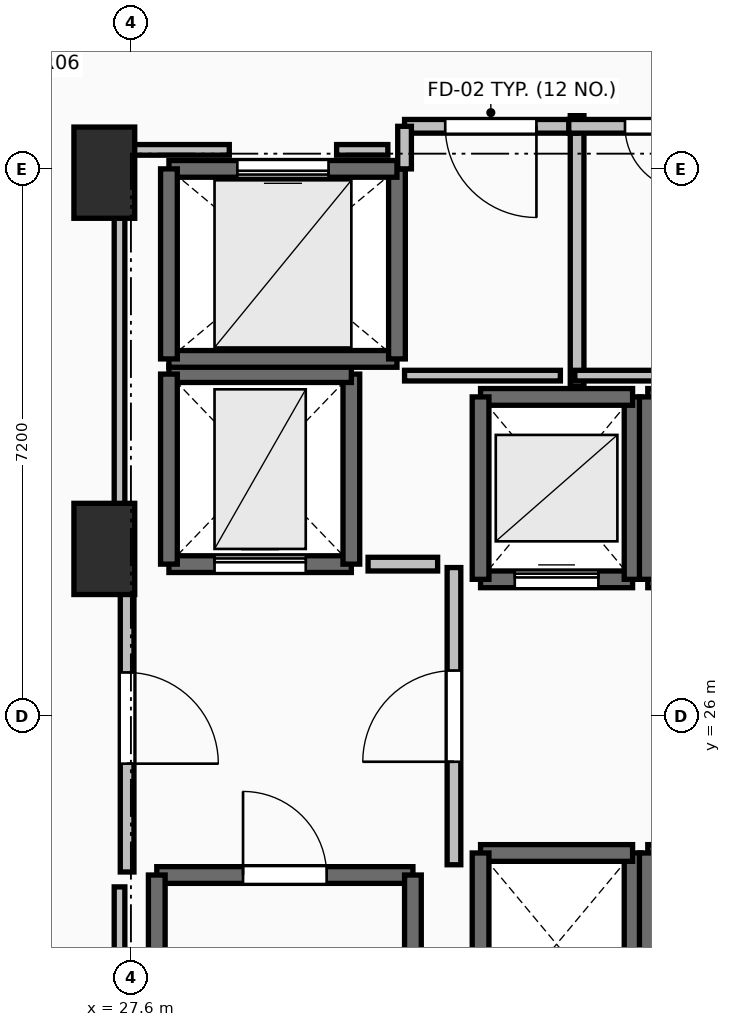
"""IFC4 building model, lengths in metres.
Left out: names, types, materials, properties, quantities, classifications, styles, units other than length and angle.
Written with IfcOpenShell. Run it as: python <this file> out.ifc"""

import sys

from ifc_helpers import new_model, si_unit, direction, frame, frame_2d, origin, origin_2d, place, context, subcontext, project, spatial, rectangle, extrude, element, fill, save


model = new_model("IFC4")
c1 = context("Model", 3, precision=1e-05, world=origin(), true_north=direction((0.0, 1.0)))
c2 = subcontext(c1, "Body", "Model", "MODEL_VIEW")
j1 = project(units=[si_unit("LENGTHUNIT", "METRE"), si_unit("PLANEANGLEUNIT", "RADIAN")], contexts=[c1])
p1 = place(None, origin())
s1 = spatial("IfcSite", under=j1, at=p1, CompositionType="ELEMENT")
p2 = place(p1, origin())
s2 = spatial("IfcBuilding", under=s1, at=p2, CompositionType="ELEMENT")
p3 = place(p2, frame((0.0, 0.0, 14.4)))
s3 = spatial("IfcBuildingStorey", under=s2, at=p3, CompositionType="ELEMENT", Elevation=14.4)
for number, where, z_axis, x_axis in (
    (1, (27.25, 28.2, 0.0), (0.0, 0.0, 1.0), (1.0, 0.0, 0.0)),
    (2, (27.25, 33.15, 0.0), (0.0, 0.0, 1.0), (1.0, 0.0, 0.0)),
):
    element("IfcColumn", number, at=place(p3, frame(where, z_axis=z_axis, x_axis=x_axis)), inside=s3, PredefinedType="PILASTER", context=c2, shape_type="SweptSolid", body=[
        extrude(rectangle(XDim=0.8, YDim=1.2, at=origin_2d()), origin(), (0.0, 0.0, 1.0), 4.8),
    ])
p4 = place(p3, frame((27.94, 23.91, 0.0), z_axis=(0.0, 0.0, 1.0), x_axis=(1.0, 0.0, 0.0)))
e3 = element("IfcWall", 3, at=p4, inside=s3, PredefinedType="SOLIDWALL", context=c2, shape_type="SweptSolid", body=[
    extrude(rectangle(XDim=3.37, YDim=0.22, at=frame_2d((1.685, 0.0))), origin(), (0.0, 0.0, 1.0), 4.48),
])
p5 = place(p4, frame((1.135, 0.0, 0.0)))
e4 = element("IfcOpeningElement", 4, at=p5, cuts=e3, PredefinedType="OPENING", context=c2, shape_type="SweptSolid", body=[
    extrude(rectangle(XDim=1.1, YDim=2.15, at=frame_2d((0.55, 1.075))), frame((0.0, 0.125, 0.0), z_axis=(0.0, -1.0, 0.0), x_axis=(1.0, 0.0, 0.0)), (0.0, 0.0, 1.0), 0.25),
])
for number, where, z_axis, x_axis in (
    (5, (31.31, 23.91, 0.0), (0.0, 0.0, 1.0), (0.0, -1.0, 0.0)),
    (6, (27.94, 16.49, 0.0), (0.0, 0.0, 1.0), (0.0, 1.0, 0.0)),
):
    element("IfcWall", number, at=place(p3, frame(where, z_axis=z_axis, x_axis=x_axis)), inside=s3, PredefinedType="SOLIDWALL", context=c2, shape_type="SweptSolid", body=[
        extrude(rectangle(XDim=7.42, YDim=0.22, at=frame_2d((3.71, 0.0))), origin(), (0.0, 0.0, 1.0), 4.48),
    ])
p6 = place(p3, frame((32.2, 27.8, 0.0), z_axis=(0.0, 0.0, 1.0), x_axis=(1.0, 0.0, 0.0)))
e7 = element("IfcWall", 7, at=p6, inside=s3, PredefinedType="SOLIDWALL", context=c2, shape_type="SweptSolid", body=[
    extrude(rectangle(XDim=2.0, YDim=0.22, at=frame_2d((1.0, 0.0))), origin(), (0.0, 0.0, 1.0), 4.48),
])
p7 = place(p6, frame((0.45, 0.0, 0.0)))
e8 = element("IfcOpeningElement", 8, at=p7, cuts=e7, PredefinedType="OPENING", context=c2, shape_type="SweptSolid", body=[
    extrude(rectangle(XDim=1.1, YDim=2.2, at=frame_2d((0.55, 1.1))), frame((0.0, 0.125, 0.0), z_axis=(0.0, -1.0, 0.0), x_axis=(1.0, 0.0, 0.0)), (0.0, 0.0, 1.0), 0.25),
])
p8 = place(p3, frame((34.2, 27.8, 0.0), z_axis=(0.0, 0.0, 1.0), x_axis=(0.0, 1.0, 0.0)))
e9 = element("IfcWall", 9, at=p8, inside=s3, PredefinedType="SOLIDWALL", context=c2, shape_type="SweptSolid", body=[
    extrude(rectangle(XDim=2.4, YDim=0.22, at=frame_2d((1.2, 0.0))), origin(), (0.0, 0.0, 1.0), 4.48),
])
p9 = place(p3, frame((34.2, 30.2, 0.0), z_axis=(0.0, 0.0, 1.0), x_axis=(-1.0, 0.0, 0.0)))
e10 = element("IfcWall", 10, at=p9, inside=s3, PredefinedType="SOLIDWALL", context=c2, shape_type="SweptSolid", body=[
    extrude(rectangle(XDim=2.0, YDim=0.22, at=frame_2d((1.0, 0.0))), origin(), (0.0, 0.0, 1.0), 4.48),
])
p10 = place(p3, frame((32.2, 30.2, 0.0), z_axis=(0.0, 0.0, 1.0), x_axis=(0.0, -1.0, 0.0)))
e11 = element("IfcWall", 11, at=p10, inside=s3, PredefinedType="SOLIDWALL", context=c2, shape_type="SweptSolid", body=[
    extrude(rectangle(XDim=2.4, YDim=0.22, at=frame_2d((1.2, 0.0))), origin(), (0.0, 0.0, 1.0), 4.48),
])
p11 = place(p3, frame((34.4, 27.8, 0.0), z_axis=(0.0, 0.0, 1.0), x_axis=(1.0, 0.0, 0.0)))
e12 = element("IfcWall", 12, at=p11, inside=s3, PredefinedType="SOLIDWALL", context=c2, shape_type="SweptSolid", body=[
    extrude(rectangle(XDim=2.0, YDim=0.22, at=frame_2d((1.0, 0.0))), origin(), (0.0, 0.0, 1.0), 4.48),
])
p12 = place(p11, frame((0.45, 0.0, 0.0)))
e13 = element("IfcOpeningElement", 13, at=p12, cuts=e12, PredefinedType="OPENING", context=c2, shape_type="SweptSolid", body=[
    extrude(rectangle(XDim=1.1, YDim=2.2, at=frame_2d((0.55, 1.1))), frame((0.0, 0.125, 0.0), z_axis=(0.0, -1.0, 0.0), x_axis=(1.0, 0.0, 0.0)), (0.0, 0.0, 1.0), 0.25),
])
p13 = place(p3, frame((36.4, 30.2, 0.0), z_axis=(0.0, 0.0, 1.0), x_axis=(-1.0, 0.0, 0.0)))
e14 = element("IfcWall", 14, at=p13, inside=s3, PredefinedType="SOLIDWALL", context=c2, shape_type="SweptSolid", body=[
    extrude(rectangle(XDim=2.0, YDim=0.22, at=frame_2d((1.0, 0.0))), origin(), (0.0, 0.0, 1.0), 4.48),
])
for number, where, z_axis, x_axis in (
    (15, (34.4, 30.2, 0.0), (0.0, 0.0, 1.0), (0.0, -1.0, 0.0)),
    (16, (34.2, 21.8, 0.0), (0.0, 0.0, 1.0), (0.0, 1.0, 0.0)),
):
    element("IfcWall", number, at=place(p3, frame(where, z_axis=z_axis, x_axis=x_axis)), inside=s3, PredefinedType="SOLIDWALL", context=c2, shape_type="SweptSolid", body=[
        extrude(rectangle(XDim=2.4, YDim=0.22, at=frame_2d((1.2, 0.0))), origin(), (0.0, 0.0, 1.0), 4.48),
    ])
p14 = place(p3, frame((34.2, 24.2, 0.0), z_axis=(0.0, 0.0, 1.0), x_axis=(-1.0, 0.0, 0.0)))
e17 = element("IfcWall", 17, at=p14, inside=s3, PredefinedType="SOLIDWALL", context=c2, shape_type="SweptSolid", body=[
    extrude(rectangle(XDim=2.0, YDim=0.22, at=frame_2d((1.0, 0.0))), origin(), (0.0, 0.0, 1.0), 4.48),
])
p15 = place(p3, frame((32.2, 24.2, 0.0), z_axis=(0.0, 0.0, 1.0), x_axis=(0.0, -1.0, 0.0)))
e18 = element("IfcWall", 18, at=p15, inside=s3, PredefinedType="SOLIDWALL", context=c2, shape_type="SweptSolid", body=[
    extrude(rectangle(XDim=2.4, YDim=0.22, at=frame_2d((1.2, 0.0))), origin(), (0.0, 0.0, 1.0), 4.48),
])
p16 = place(p3, frame((36.4, 24.2, 0.0), z_axis=(0.0, 0.0, 1.0), x_axis=(-1.0, 0.0, 0.0)))
e19 = element("IfcWall", 19, at=p16, inside=s3, PredefinedType="SOLIDWALL", context=c2, shape_type="SweptSolid", body=[
    extrude(rectangle(XDim=2.0, YDim=0.22, at=frame_2d((1.0, 0.0))), origin(), (0.0, 0.0, 1.0), 4.48),
])
p17 = place(p3, frame((34.4, 24.2, 0.0), z_axis=(0.0, 0.0, 1.0), x_axis=(0.0, -1.0, 0.0)))
e20 = element("IfcWall", 20, at=p17, inside=s3, PredefinedType="SOLIDWALL", context=c2, shape_type="SweptSolid", body=[
    extrude(rectangle(XDim=2.4, YDim=0.22, at=frame_2d((1.2, 0.0))), origin(), (0.0, 0.0, 1.0), 4.48),
])
p18 = place(p3, frame((28.1, 28.0, 0.0), z_axis=(0.0, 0.0, 1.0), x_axis=(1.0, 0.0, 0.0)))
e21 = element("IfcWall", 21, at=p18, inside=s3, PredefinedType="SHEAR", context=c2, shape_type="SweptSolid", body=[
    extrude(rectangle(XDim=2.4, YDim=0.22, at=frame_2d((1.2, 0.0))), origin(), (0.0, 0.0, 1.0), 4.48),
])
p19 = place(p18, frame((0.6, 0.0, 0.0)))
e22 = element("IfcOpeningElement", 22, at=p19, cuts=e21, PredefinedType="OPENING", context=c2, shape_type="SweptSolid", body=[
    extrude(rectangle(XDim=1.2, YDim=2.2, at=frame_2d((0.6, 1.1))), frame((0.0, 0.125, 0.0), z_axis=(0.0, -1.0, 0.0), x_axis=(1.0, 0.0, 0.0)), (0.0, 0.0, 1.0), 0.25),
])
p20 = place(p3, frame((30.5, 28.0, 0.0), z_axis=(0.0, 0.0, 1.0), x_axis=(0.0, 1.0, 0.0)))
e23 = element("IfcWall", 23, at=p20, inside=s3, PredefinedType="SHEAR", context=c2, shape_type="SweptSolid", body=[
    extrude(rectangle(XDim=2.5, YDim=0.22, at=frame_2d((1.25, 0.0))), origin(), (0.0, 0.0, 1.0), 4.48),
])
p21 = place(p3, frame((30.5, 30.5, 0.0), z_axis=(0.0, 0.0, 1.0), x_axis=(-1.0, 0.0, 0.0)))
e24 = element("IfcWall", 24, at=p21, inside=s3, PredefinedType="SHEAR", context=c2, shape_type="SweptSolid", body=[
    extrude(rectangle(XDim=2.4, YDim=0.22, at=frame_2d((1.2, 0.0))), origin(), (0.0, 0.0, 1.0), 4.48),
])
p22 = place(p3, frame((28.1, 30.5, 0.0), z_axis=(0.0, 0.0, 1.0), x_axis=(0.0, -1.0, 0.0)))
e25 = element("IfcWall", 25, at=p22, inside=s3, PredefinedType="SHEAR", context=c2, shape_type="SweptSolid", body=[
    extrude(rectangle(XDim=2.5, YDim=0.22, at=frame_2d((1.25, 0.0))), origin(), (0.0, 0.0, 1.0), 4.48),
])
p23 = place(p3, frame((28.1, 30.7, 0.0), z_axis=(0.0, 0.0, 1.0), x_axis=(1.0, 0.0, 0.0)))
e26 = element("IfcWall", 26, at=p23, inside=s3, PredefinedType="SOLIDWALL", context=c2, shape_type="SweptSolid", body=[
    extrude(rectangle(XDim=3.0, YDim=0.22, at=frame_2d((1.5, 0.0))), origin(), (0.0, 0.0, 1.0), 4.48),
])
p24 = place(p3, frame((31.1, 30.7, 0.0), z_axis=(0.0, 0.0, 1.0), x_axis=(0.0, 1.0, 0.0)))
e27 = element("IfcWall", 27, at=p24, inside=s3, PredefinedType="SOLIDWALL", context=c2, shape_type="SweptSolid", body=[
    extrude(rectangle(XDim=2.5, YDim=0.22, at=frame_2d((1.25, 0.0))), origin(), (0.0, 0.0, 1.0), 4.48),
])
p25 = place(p3, frame((31.1, 33.2, 0.0), z_axis=(0.0, 0.0, 1.0), x_axis=(-1.0, 0.0, 0.0)))
e28 = element("IfcWall", 28, at=p25, inside=s3, PredefinedType="SOLIDWALL", context=c2, shape_type="SweptSolid", body=[
    extrude(rectangle(XDim=3.0, YDim=0.22, at=frame_2d((1.5, 0.0))), origin(), (0.0, 0.0, 1.0), 4.48),
])
p26 = place(p25, frame((0.9, 0.0, 0.0)))
e29 = element("IfcOpeningElement", 29, at=p26, cuts=e28, PredefinedType="OPENING", context=c2, shape_type="SweptSolid", body=[
    extrude(rectangle(XDim=1.2, YDim=2.2, at=frame_2d((0.6, 1.1))), frame((0.0, 0.125, 0.0), z_axis=(0.0, -1.0, 0.0), x_axis=(1.0, 0.0, 0.0)), (0.0, 0.0, 1.0), 0.25),
])
p27 = place(p3, frame((28.1, 33.2, 0.0), z_axis=(0.0, 0.0, 1.0), x_axis=(0.0, -1.0, 0.0)))
e30 = element("IfcWall", 30, at=p27, inside=s3, PredefinedType="SOLIDWALL", context=c2, shape_type="SweptSolid", body=[
    extrude(rectangle(XDim=2.5, YDim=0.22, at=frame_2d((1.25, 0.0))), origin(), (0.0, 0.0, 1.0), 4.48),
])
p28 = place(p3, frame((31.85, 24.045, 0.0), z_axis=(0.0, 0.0, 1.0), x_axis=(0.0, 1.0, 0.0)))
e31 = element("IfcWall", 31, at=p28, inside=s3, PredefinedType="PARTITIONING", context=c2, shape_type="SweptSolid", body=[
    extrude(rectangle(XDim=3.91, YDim=0.18, at=frame_2d((1.955, 0.0))), origin(), (0.0, 0.0, 1.0), 4.48),
])
p29 = place(p28, frame((1.355, 0.0, 0.0)))
e32 = element("IfcOpeningElement", 32, at=p29, cuts=e31, PredefinedType="OPENING", context=c2, shape_type="SweptSolid", body=[
    extrude(rectangle(XDim=1.2, YDim=2.15, at=frame_2d((0.6, 1.075))), frame((0.0, 0.105, 0.0), z_axis=(0.0, -1.0, 0.0), x_axis=(1.0, 0.0, 0.0)), (0.0, 0.0, 1.0), 0.21),
])
p30 = place(p3, frame((27.55, 28.0, 0.0), z_axis=(0.0, 0.0, 1.0), x_axis=(0.0, -1.0, 0.0)))
e33 = element("IfcWall", 33, at=p30, inside=s3, PredefinedType="PARTITIONING", context=c2, shape_type="SweptSolid", body=[
    extrude(rectangle(XDim=4.05, YDim=0.18, at=frame_2d((2.025, 0.0))), origin(), (0.0, 0.0, 1.0), 4.48),
])
p31 = place(p30, frame((1.425, 0.0, 0.0)))
e34 = element("IfcOpeningElement", 34, at=p31, cuts=e33, PredefinedType="OPENING", context=c2, shape_type="SweptSolid", body=[
    extrude(rectangle(XDim=1.2, YDim=2.15, at=frame_2d((0.6, 1.075))), frame((0.0, 0.105, 0.0), z_axis=(0.0, -1.0, 0.0), x_axis=(1.0, 0.0, 0.0)), (0.0, 0.0, 1.0), 0.21),
])
p32 = place(p3, frame((33.47, 30.34, 0.0), z_axis=(0.0, 0.0, 1.0), x_axis=(0.0, 1.0, 0.0)))
e35 = element("IfcWall", 35, at=p32, inside=s3, PredefinedType="PARTITIONING", context=c2, shape_type="SweptSolid", body=[
    extrude(rectangle(XDim=3.56, YDim=0.18, at=frame_2d((1.78, 0.0))), origin(), (0.0, 0.0, 1.0), 4.48),
])
p33 = place(p3, frame((33.47, 33.76, 0.0), z_axis=(0.0, 0.0, 1.0), x_axis=(-1.0, 0.0, 0.0)))
e36 = element("IfcWall", 36, at=p33, inside=s3, PredefinedType="PARTITIONING", context=c2, shape_type="SweptSolid", body=[
    extrude(rectangle(XDim=2.27, YDim=0.18, at=frame_2d((1.135, 0.0))), origin(), (0.0, 0.0, 1.0), 4.48),
])
p34 = place(p33, frame((0.535, 0.0, 0.0)))
e37 = element("IfcOpeningElement", 37, at=p34, cuts=e36, PredefinedType="OPENING", context=c2, shape_type="SweptSolid", body=[
    extrude(rectangle(XDim=1.2, YDim=2.15, at=frame_2d((0.6, 1.075))), frame((0.0, 0.105, 0.0), z_axis=(0.0, -1.0, 0.0), x_axis=(1.0, 0.0, 0.0)), (0.0, 0.0, 1.0), 0.21),
])
p35 = place(p3, frame((31.2, 33.76, 0.0), z_axis=(0.0, 0.0, 1.0), x_axis=(0.0, -1.0, 0.0)))
e38 = element("IfcWall", 38, at=p35, inside=s3, PredefinedType="PARTITIONING", context=c2, shape_type="SweptSolid", body=[
    extrude(rectangle(XDim=0.56, YDim=0.18, at=frame_2d((0.28, 0.0))), origin(), (0.0, 0.0, 1.0), 4.48),
])
p36 = place(p3, frame((35.69, 33.76, 0.0), z_axis=(0.0, 0.0, 1.0), x_axis=(-1.0, 0.0, 0.0)))
e39 = element("IfcWall", 39, at=p36, inside=s3, PredefinedType="PARTITIONING", context=c2, shape_type="SweptSolid", body=[
    extrude(rectangle(XDim=2.33, YDim=0.18, at=frame_2d((1.165, 0.0))), origin(), (0.0, 0.0, 1.0), 4.48),
])
p37 = place(p36, frame((0.74, 0.0, 0.0)))
e40 = element("IfcOpeningElement", 40, at=p37, cuts=e39, PredefinedType="OPENING", context=c2, shape_type="SweptSolid", body=[
    extrude(rectangle(XDim=0.85, YDim=2.1, at=frame_2d((0.425, 1.05))), frame((0.0, 0.105, 0.0), z_axis=(0.0, -1.0, 0.0), x_axis=(1.0, 0.0, 0.0)), (0.0, 0.0, 1.0), 0.21),
])
p38 = place(p3, frame((31.635, 28.0, 0.0), z_axis=(0.0, 0.0, 1.0), x_axis=(-1.0, 0.0, 0.0)))
e41 = element("IfcWall", 41, at=p38, inside=s3, PredefinedType="PARTITIONING", context=c2, shape_type="SweptSolid", body=[
    extrude(rectangle(XDim=0.915, YDim=0.18, at=frame_2d((0.458, 0.0))), origin(), (0.0, 0.0, 1.0), 4.48),
])
p39 = place(p3, frame((31.2, 30.48, 0.0), z_axis=(0.0, 0.0, 1.0), x_axis=(1.0, 0.0, 0.0)))
e42 = element("IfcWall", 42, at=p39, inside=s3, PredefinedType="PARTITIONING", context=c2, shape_type="SweptSolid", body=[
    extrude(rectangle(XDim=2.05, YDim=0.14, at=frame_2d((1.025, 0.0))), origin(), (0.0, 0.0, 1.0), 4.48),
])
p40 = place(p3, frame((33.44, 30.48, 0.0), z_axis=(0.0, 0.0, 1.0), x_axis=(1.0, 0.0, 0.0)))
e43 = element("IfcWall", 43, at=p40, inside=s3, PredefinedType="PARTITIONING", context=c2, shape_type="SweptSolid", body=[
    extrude(rectangle(XDim=2.14, YDim=0.14, at=frame_2d((1.07, 0.0))), origin(), (0.0, 0.0, 1.0), 3.672),
])
p41 = place(p3, frame((27.45, 16.24, 0.0), z_axis=(0.0, 0.0, 1.0), x_axis=(0.0, 1.0, 0.0)))
e44 = element("IfcWall", 44, at=p41, inside=s3, PredefinedType="PARTITIONING", context=c2, shape_type="SweptSolid", body=[
    extrude(rectangle(XDim=7.514, YDim=0.14, at=frame_2d((3.757, 0.0))), origin(), (0.0, 0.0, 1.0), 2.406),
])
p42 = place(p3, frame((27.45, 28.196, 0.0), z_axis=(0.0, 0.0, 1.0), x_axis=(0.0, 1.0, 0.0)))
e45 = element("IfcWall", 45, at=p42, inside=s3, PredefinedType="PARTITIONING", context=c2, shape_type="SweptSolid", body=[
    extrude(rectangle(XDim=5.254, YDim=0.14, at=frame_2d((2.627, 0.0))), origin(), (0.0, 0.0, 1.0), 3.672),
])
p43 = place(p3, frame((27.45, 33.45, 0.0), z_axis=(0.0, 0.0, 1.0), x_axis=(1.0, 0.0, 0.0)))
e46 = element("IfcWall", 46, at=p43, inside=s3, PredefinedType="PARTITIONING", context=c2, shape_type="SweptSolid", body=[
    extrude(rectangle(XDim=1.444, YDim=0.14, at=frame_2d((0.722, 0.0))), origin(), (0.0, 0.0, 1.0), 3.672),
])
p44 = place(p3, frame((30.306, 33.45, 0.0), z_axis=(0.0, 0.0, 1.0), x_axis=(1.0, 0.0, 0.0)))
e47 = element("IfcWall", 47, at=p44, inside=s3, PredefinedType="PARTITIONING", context=c2, shape_type="SweptSolid", body=[
    extrude(rectangle(XDim=0.674, YDim=0.14, at=frame_2d((0.337, 0.0))), origin(), (0.0, 0.0, 1.0), 4.48),
])
p45 = place(p5, origin())
e48 = element("IfcDoor", 48, at=p45, inside=s3, OperationType="SINGLE_SWING_LEFT", PredefinedType="DOOR", context=c2, shape_type="SweptSolid", body=[
    extrude(rectangle(XDim=1.1, YDim=2.15, at=frame_2d((0.55, 1.075))), frame((0.0, 0.025, 0.0), z_axis=(0.0, -1.0, 0.0), x_axis=(1.0, 0.0, 0.0)), (0.0, 0.0, 1.0), 0.05),
])
fill(e4, e48)
p46 = place(p7, origin())
e49 = element("IfcDoor", 49, at=p46, inside=s3, OperationType="SLIDING_TO_LEFT", PredefinedType="DOOR", context=c2, shape_type="SweptSolid", body=[
    extrude(rectangle(XDim=1.1, YDim=2.2, at=frame_2d((0.55, 1.1))), frame((0.0, 0.025, 0.0), z_axis=(0.0, -1.0, 0.0), x_axis=(1.0, 0.0, 0.0)), (0.0, 0.0, 1.0), 0.05),
])
fill(e8, e49)
p47 = place(p19, origin())
e50 = element("IfcDoor", 50, at=p47, inside=s3, OperationType="SLIDING_TO_LEFT", PredefinedType="DOOR", context=c2, shape_type="SweptSolid", body=[
    extrude(rectangle(XDim=1.2, YDim=2.2, at=frame_2d((0.6, 1.1))), frame((0.0, 0.025, 0.0), z_axis=(0.0, -1.0, 0.0), x_axis=(1.0, 0.0, 0.0)), (0.0, 0.0, 1.0), 0.05),
])
fill(e22, e50)
p48 = place(p26, origin())
e51 = element("IfcDoor", 51, at=p48, inside=s3, OperationType="SLIDING_TO_LEFT", PredefinedType="DOOR", context=c2, shape_type="SweptSolid", body=[
    extrude(rectangle(XDim=1.2, YDim=2.2, at=frame_2d((0.6, 1.1))), frame((0.0, 0.025, 0.0), z_axis=(0.0, -1.0, 0.0), x_axis=(1.0, 0.0, 0.0)), (0.0, 0.0, 1.0), 0.05),
])
fill(e29, e51)
p49 = place(p29, origin())
e52 = element("IfcDoor", 52, at=p49, inside=s3, OperationType="SINGLE_SWING_LEFT", PredefinedType="DOOR", context=c2, shape_type="SweptSolid", body=[
    extrude(rectangle(XDim=1.2, YDim=2.15, at=frame_2d((0.6, 1.075))), frame((0.0, 0.025, 0.0), z_axis=(0.0, -1.0, 0.0), x_axis=(1.0, 0.0, 0.0)), (0.0, 0.0, 1.0), 0.05),
])
fill(e32, e52)
p50 = place(p31, origin())
e53 = element("IfcDoor", 53, at=p50, inside=s3, OperationType="SINGLE_SWING_RIGHT", PredefinedType="DOOR", context=c2, shape_type="SweptSolid", body=[
    extrude(rectangle(XDim=1.2, YDim=2.15, at=frame_2d((0.6, 1.075))), frame((0.0, 0.025, 0.0), z_axis=(0.0, -1.0, 0.0), x_axis=(1.0, 0.0, 0.0)), (0.0, 0.0, 1.0), 0.05),
])
fill(e34, e53)
p51 = place(p34, origin())
e54 = element("IfcDoor", 54, at=p51, inside=s3, OperationType="SINGLE_SWING_LEFT", PredefinedType="DOOR", context=c2, shape_type="SweptSolid", body=[
    extrude(rectangle(XDim=1.2, YDim=2.15, at=frame_2d((0.6, 1.075))), frame((0.0, 0.025, 0.0), z_axis=(0.0, -1.0, 0.0), x_axis=(1.0, 0.0, 0.0)), (0.0, 0.0, 1.0), 0.05),
])
fill(e37, e54)
p52 = place(p37, origin())
e55 = element("IfcDoor", 55, at=p52, inside=s3, OperationType="SINGLE_SWING_LEFT", PredefinedType="DOOR", context=c2, shape_type="SweptSolid", body=[
    extrude(rectangle(XDim=0.85, YDim=2.1, at=frame_2d((0.425, 1.05))), frame((0.0, 0.025, 0.0), z_axis=(0.0, -1.0, 0.0), x_axis=(1.0, 0.0, 0.0)), (0.0, 0.0, 1.0), 0.05),
])
fill(e40, e55)
save(model, sys.argv[1])
